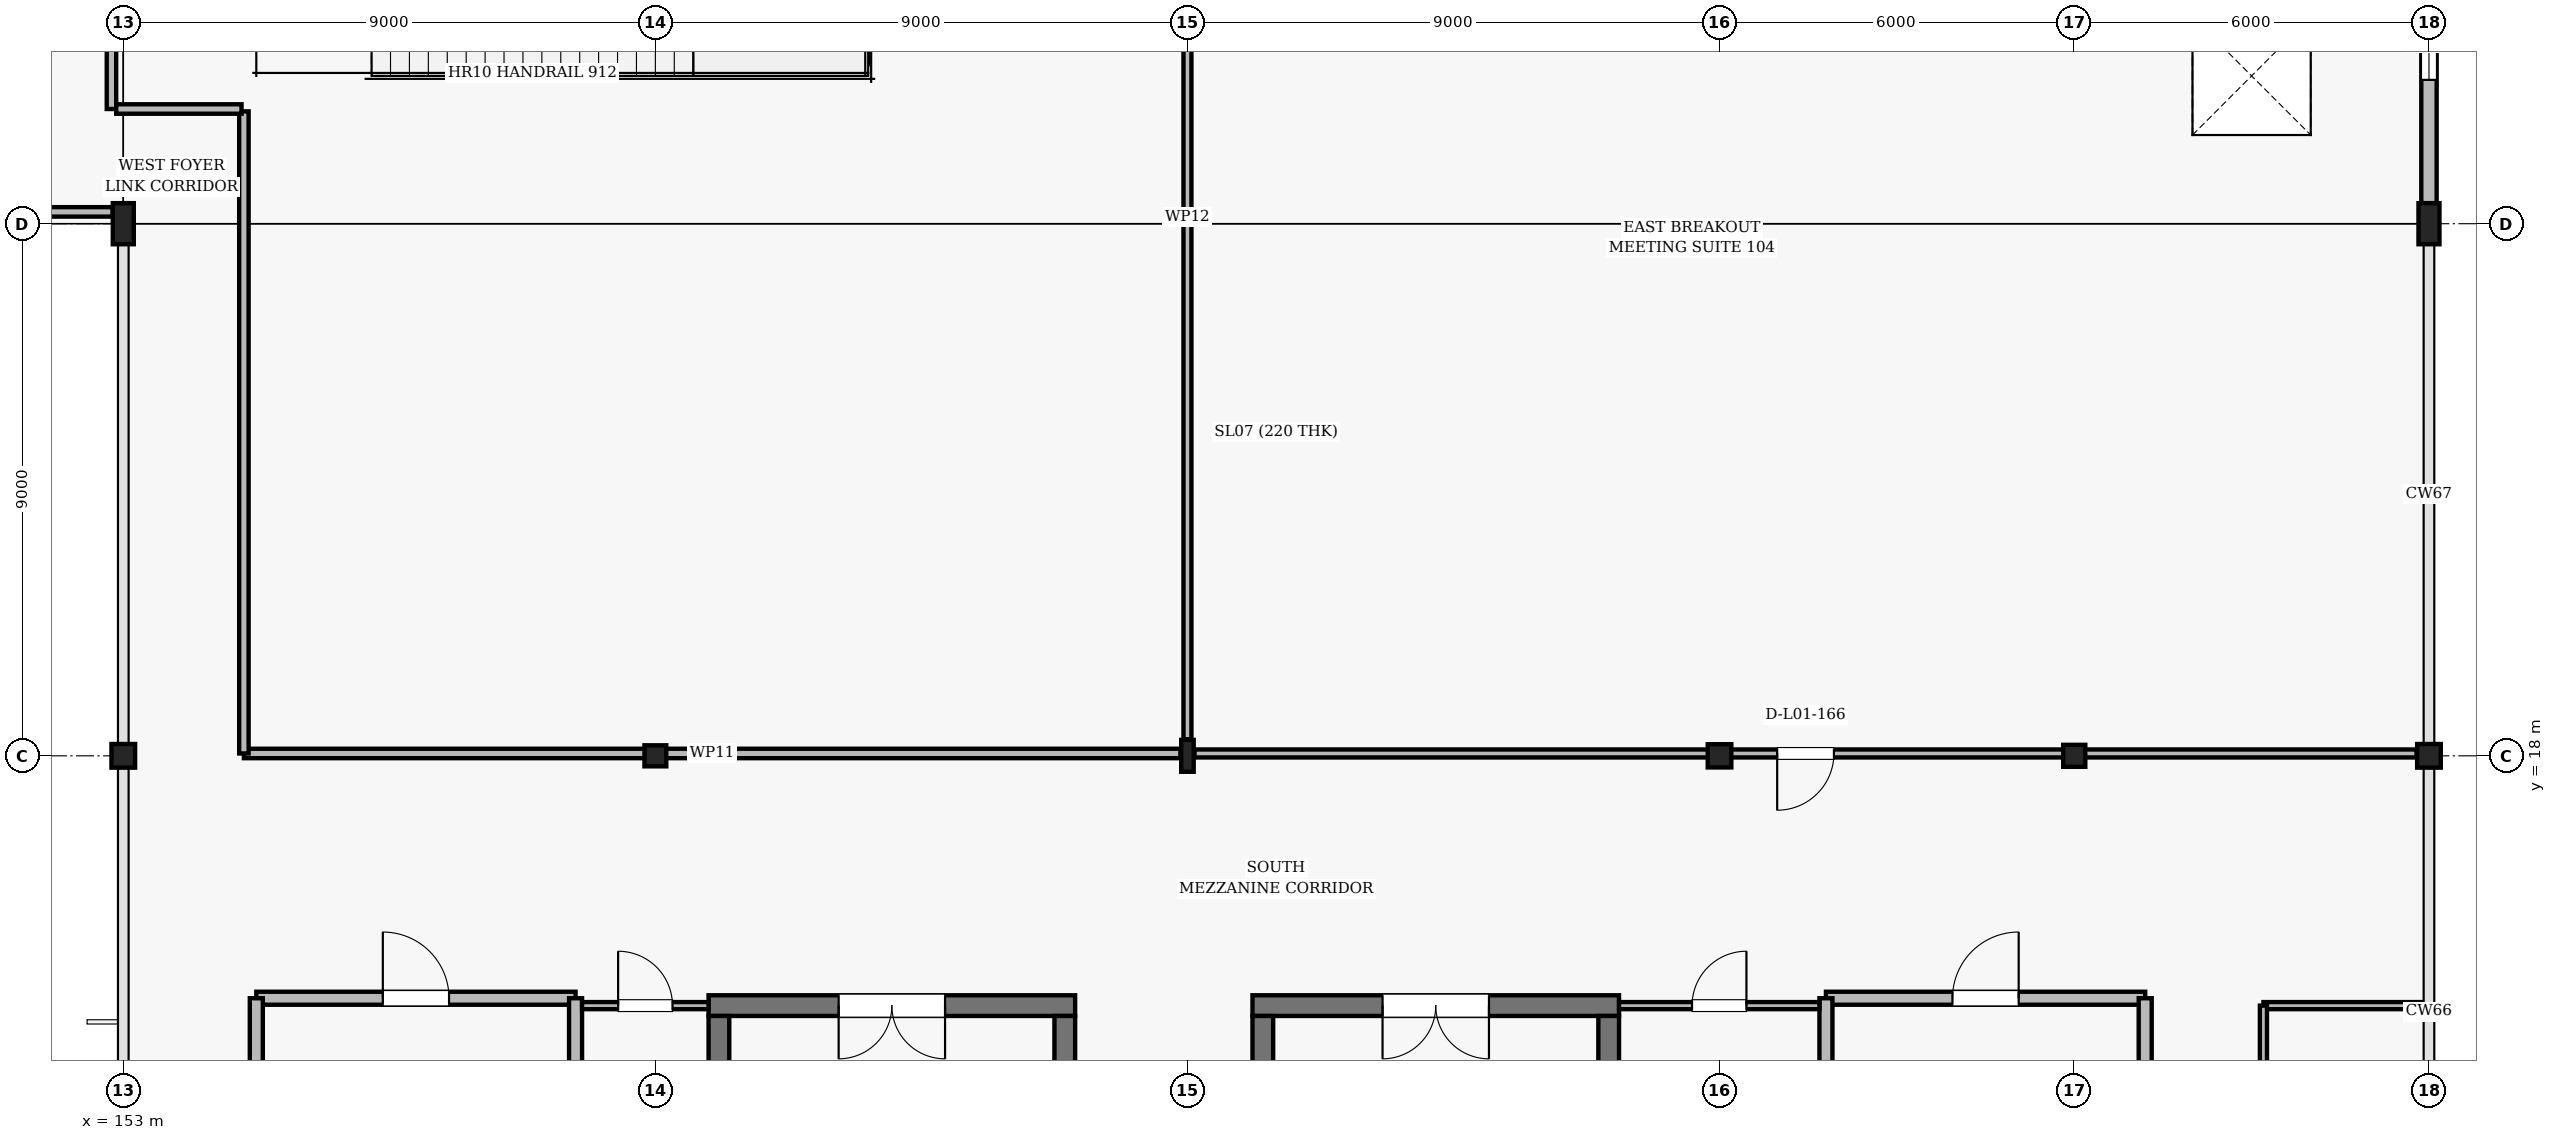
"""IFC4 building model, lengths in metres.
Left out: names, types, materials, properties, quantities, classifications, styles, units other than length and angle.
Written with IfcOpenShell. Run it as: python <this file> out.ifc"""

import sys

from ifc_helpers import new_model, si_unit, direction, frame, frame_2d, origin, origin_2d, place, context, subcontext, project, spatial, rectangle, hollow_rectangle, i_section, extrude, element, fill, save


model = new_model("IFC4")
c1 = context("Model", 3, precision=1e-05, world=origin(), true_north=direction((0.0, 1.0)))
c2 = subcontext(c1, "Body", "Model", "MODEL_VIEW")
j1 = project(units=[si_unit("LENGTHUNIT", "METRE"), si_unit("PLANEANGLEUNIT", "RADIAN")], contexts=[c1])
p1 = place(None, origin())
s1 = spatial("IfcSite", under=j1, at=p1, CompositionType="ELEMENT")
p2 = place(p1, origin())
s2 = spatial("IfcBuilding", under=s1, at=p2, CompositionType="ELEMENT")
p3 = place(p2, frame((0.0, 0.0, 5.4)))
s3 = spatial("IfcBuildingStorey", under=s2, at=p3, CompositionType="ELEMENT", Elevation=5.4)
p4 = place(p3, frame((153.0, 18.0, 0.0), z_axis=(0.0, 0.0, 1.0), x_axis=(1.0, 0.0, 0.0)))
e1 = element("IfcColumn", 1, at=p4, inside=s3, PredefinedType="COLUMN", context=c2, shape_type="SweptSolid", body=[
    extrude(hollow_rectangle(XDim=0.4, YDim=0.4, WallThickness=0.016, InnerFilletRadius=0.016, OuterFilletRadius=0.032, at=origin_2d()), origin(), (0.0, 0.0, 1.0), 5.4),
])
p5 = place(p3, frame((153.0, 27.0, 0.0), z_axis=(0.0, 0.0, 1.0), x_axis=(1.0, 0.0, 0.0)))
e2 = element("IfcColumn", 2, at=p5, inside=s3, PredefinedType="COLUMN", context=c2, shape_type="SweptSolid", body=[
    extrude(i_section(OverallWidth=0.355, OverallDepth=0.695, WebThickness=0.015, FlangeThickness=0.025, FilletRadius=0.018, at=origin_2d()), origin(), (0.0, 0.0, 1.0), 5.4),
])
p6 = place(p3, frame((162.0, 18.0, 0.0), z_axis=(0.0, 0.0, 1.0), x_axis=(1.0, 0.0, 0.0)))
e3 = element("IfcColumn", 3, at=p6, inside=s3, PredefinedType="COLUMN", context=c2, shape_type="SweptSolid", body=[
    extrude(i_section(OverallWidth=0.369, OverallDepth=0.356, WebThickness=0.011, FlangeThickness=0.018, FilletRadius=0.015, at=origin_2d()), origin(), (0.0, 0.0, 1.0), 5.4),
])
p7 = place(p3, frame((171.0, 18.0, 0.0), z_axis=(0.0, 0.0, 1.0), x_axis=(1.0, 0.0, 0.0)))
e4 = element("IfcColumn", 4, at=p7, inside=s3, PredefinedType="COLUMN", context=c2, shape_type="SweptSolid", body=[
    extrude(i_section(OverallWidth=0.211, OverallDepth=0.539, WebThickness=0.012, FlangeThickness=0.019, FilletRadius=0.014, at=origin_2d()), origin(), (0.0, 0.0, 1.0), 5.4),
])
p8 = place(p3, frame((180.0, 18.0, 0.0), z_axis=(0.0, 0.0, 1.0), x_axis=(1.0, 0.0, 0.0)))
e5 = element("IfcColumn", 5, at=p8, inside=s3, PredefinedType="COLUMN", context=c2, shape_type="SweptSolid", body=[
    extrude(i_section(OverallWidth=0.399, OverallDepth=0.393, WebThickness=0.023, FlangeThickness=0.037, FilletRadius=0.018, at=origin_2d()), origin(), (0.0, 0.0, 1.0), 5.4),
])
p9 = place(p3, frame((186.0, 18.0, 0.0), z_axis=(0.0, 0.0, 1.0), x_axis=(1.0, 0.0, 0.0)))
e6 = element("IfcColumn", 6, at=p9, inside=s3, PredefinedType="COLUMN", context=c2, shape_type="SweptSolid", body=[
    extrude(i_section(OverallWidth=0.374, OverallDepth=0.372, WebThickness=0.016, FlangeThickness=0.026, FilletRadius=0.016, at=origin_2d()), origin(), (0.0, 0.0, 1.0), 5.4),
])
p10 = place(p3, frame((192.0, 18.0, 0.0), z_axis=(0.0, 0.0, 1.0), x_axis=(1.0, 0.0, 0.0)))
e7 = element("IfcColumn", 7, at=p10, inside=s3, PredefinedType="COLUMN", context=c2, shape_type="SweptSolid", body=[
    extrude(hollow_rectangle(XDim=0.4, YDim=0.4, WallThickness=0.016, InnerFilletRadius=0.016, OuterFilletRadius=0.032, at=origin_2d()), origin(), (0.0, 0.0, 1.0), 5.4),
])
p11 = place(p3, frame((192.0, 27.0, 0.0), z_axis=(0.0, 0.0, 1.0), x_axis=(1.0, 0.0, 0.0)))
e8 = element("IfcColumn", 8, at=p11, inside=s3, PredefinedType="COLUMN", context=c2, shape_type="SweptSolid", body=[
    extrude(i_section(OverallWidth=0.355, OverallDepth=0.695, WebThickness=0.015, FlangeThickness=0.025, FilletRadius=0.018, at=origin_2d()), origin(), (0.0, 0.0, 1.0), 5.4),
])
p12 = place(p3, frame((192.0, 35.788, 0.0), z_axis=(0.0, 0.0, 1.0), x_axis=(0.0, -1.0, 0.0)))
e9 = element("IfcWall", 9, at=p12, inside=s3, PredefinedType="SOLIDWALL", context=c2, shape_type="SweptSolid", body=[
    extrude(rectangle(XDim=8.44, YDim=0.26, at=frame_2d((4.22, 0.0))), origin(), (0.0, 0.0, 1.0), 4.825),
])
p13 = place(p12, frame((5.105, 0.0, 0.95)))
e10 = element("IfcOpeningElement", 10, at=p13, cuts=e9, PredefinedType="OPENING", context=c2, shape_type="SweptSolid", body=[
    extrude(rectangle(XDim=1.25, YDim=1.55, at=frame_2d((0.625, 0.775))), frame((0.0, 0.14, 0.0), z_axis=(0.0, -1.0, 0.0), x_axis=(1.0, 0.0, 0.0)), (0.0, 0.0, 1.0), 0.28),
])
p14 = place(p3, frame((169.1, 13.775, 0.0), z_axis=(0.0, 0.0, 1.0), x_axis=(-1.0, 0.0, 0.0)))
e11 = element("IfcWall", 11, at=p14, inside=s3, PredefinedType="SHEAR", context=c2, shape_type="SweptSolid", body=[
    extrude(rectangle(XDim=6.2, YDim=0.35, at=frame_2d((3.1, 0.0))), origin(), (0.0, 0.0, 1.0), 5.18),
])
p15 = place(p14, frame((2.2, 0.0, 0.0)))
e12 = element("IfcOpeningElement", 12, at=p15, cuts=e11, PredefinedType="OPENING", context=c2, shape_type="SweptSolid", body=[
    extrude(rectangle(XDim=1.8, YDim=2.2, at=frame_2d((0.9, 1.1))), frame((0.0, 0.185, 0.0), z_axis=(0.0, -1.0, 0.0), x_axis=(1.0, 0.0, 0.0)), (0.0, 0.0, 1.0), 0.37),
])
for number, where, z_axis, x_axis in (
    (13, (163.075, 13.6, 0.0), (0.0, 0.0, 1.0), (0.0, -1.0, 0.0)),
    (14, (168.925, 2.2, 0.0), (0.0, 0.0, 1.0), (0.0, 1.0, 0.0)),
):
    element("IfcWall", number, at=place(p3, frame(where, z_axis=z_axis, x_axis=x_axis)), inside=s3, PredefinedType="SHEAR", context=c2, shape_type="SweptSolid", body=[
        extrude(rectangle(XDim=11.4, YDim=0.35, at=frame_2d((5.7, 0.0))), origin(), (0.0, 0.0, 1.0), 5.18),
    ])
p16 = place(p3, frame((178.3, 13.775, 0.0), z_axis=(0.0, 0.0, 1.0), x_axis=(-1.0, 0.0, 0.0)))
e15 = element("IfcWall", 15, at=p16, inside=s3, PredefinedType="SHEAR", context=c2, shape_type="SweptSolid", body=[
    extrude(rectangle(XDim=6.2, YDim=0.35, at=frame_2d((3.1, 0.0))), origin(), (0.0, 0.0, 1.0), 5.18),
])
p17 = place(p16, frame((2.2, 0.0, 0.0)))
e16 = element("IfcOpeningElement", 16, at=p17, cuts=e15, PredefinedType="OPENING", context=c2, shape_type="SweptSolid", body=[
    extrude(rectangle(XDim=1.8, YDim=2.2, at=frame_2d((0.9, 1.1))), frame((0.0, 0.185, 0.0), z_axis=(0.0, -1.0, 0.0), x_axis=(1.0, 0.0, 0.0)), (0.0, 0.0, 1.0), 0.37),
])
for number, where, z_axis, x_axis in (
    (17, (172.275, 13.6, 0.0), (0.0, 0.0, 1.0), (0.0, -1.0, 0.0)),
    (18, (178.125, 2.2, 0.0), (0.0, 0.0, 1.0), (0.0, 1.0, 0.0)),
):
    element("IfcWall", number, at=place(p3, frame(where, z_axis=z_axis, x_axis=x_axis)), inside=s3, PredefinedType="SHEAR", context=c2, shape_type="SweptSolid", body=[
        extrude(rectangle(XDim=11.4, YDim=0.35, at=frame_2d((5.7, 0.0))), origin(), (0.0, 0.0, 1.0), 5.18),
    ])
p18 = place(p3, frame((162.72, 29.7, 0.0), z_axis=(0.0, 0.0, 1.0), x_axis=(1.0, 0.0, 0.0)))
e19 = element("IfcWall", 19, at=p18, inside=s3, PredefinedType="SHEAR", context=c2, shape_type="SweptSolid", body=[
    extrude(rectangle(XDim=2.7, YDim=0.35, at=frame_2d((1.35, 0.0))), origin(), (0.0, 0.0, 1.0), 2.5),
])
p19 = place(p3, frame((165.42, 29.7, 0.0), z_axis=(0.0, 0.0, 1.0), x_axis=(0.0, 1.0, 0.0)))
e20 = element("IfcWall", 20, at=p19, inside=s3, PredefinedType="SHEAR", context=c2, shape_type="SweptSolid", body=[
    extrude(rectangle(XDim=3.78, YDim=0.35, at=frame_2d((1.89, 0.0))), origin(), (0.0, 0.0, 1.0), 2.5),
])
p20 = place(p3, frame((155.25, 13.9, 0.0), z_axis=(0.0, 0.0, 1.0), x_axis=(1.0, 0.0, 0.0)))
e21 = element("IfcWall", 21, at=p20, inside=s3, PredefinedType="SOLIDWALL", context=c2, shape_type="SweptSolid", body=[
    extrude(rectangle(XDim=5.4, YDim=0.22, at=frame_2d((2.7, 0.0))), origin(), (0.0, 0.0, 1.0), 5.16),
])
p21 = place(p20, frame((2.14, 0.0, 0.0)))
e22 = element("IfcOpeningElement", 22, at=p21, cuts=e21, PredefinedType="OPENING", context=c2, shape_type="SweptSolid", body=[
    extrude(rectangle(XDim=1.12, YDim=2.2, at=frame_2d((0.56, 1.1))), frame((0.0, 0.12, 0.0), z_axis=(0.0, -1.0, 0.0), x_axis=(1.0, 0.0, 0.0)), (0.0, 0.0, 1.0), 0.24),
])
for number, where, z_axis, x_axis in (
    (23, (155.25, 10.85, 0.0), (0.0, 0.0, 1.0), (0.0, 1.0, 0.0)),
    (24, (160.65, 10.85, 0.0), (0.0, 0.0, 1.0), (0.0, 1.0, 0.0)),
):
    element("IfcWall", number, at=place(p3, frame(where, z_axis=z_axis, x_axis=x_axis)), inside=s3, PredefinedType="SOLIDWALL", context=c2, shape_type="SweptSolid", body=[
        extrude(rectangle(XDim=3.05, YDim=0.22, at=frame_2d((1.525, 0.0))), origin(), (0.0, 0.0, 1.0), 5.16),
    ])
p22 = place(p3, frame((181.8, 13.9, 0.0), z_axis=(0.0, 0.0, 1.0), x_axis=(1.0, 0.0, 0.0)))
e25 = element("IfcWall", 25, at=p22, inside=s3, PredefinedType="SOLIDWALL", context=c2, shape_type="SweptSolid", body=[
    extrude(rectangle(XDim=5.4, YDim=0.22, at=frame_2d((2.7, 0.0))), origin(), (0.0, 0.0, 1.0), 5.16),
])
p23 = place(p22, frame((2.14, 0.0, 0.0)))
e26 = element("IfcOpeningElement", 26, at=p23, cuts=e25, PredefinedType="OPENING", context=c2, shape_type="SweptSolid", body=[
    extrude(rectangle(XDim=1.12, YDim=2.2, at=frame_2d((0.56, 1.1))), frame((0.0, 0.12, 0.0), z_axis=(0.0, -1.0, 0.0), x_axis=(1.0, 0.0, 0.0)), (0.0, 0.0, 1.0), 0.24),
])
for number, where, z_axis, x_axis in (
    (27, (181.8, 10.85, 0.0), (0.0, 0.0, 1.0), (0.0, 1.0, 0.0)),
    (28, (187.2, 10.85, 0.0), (0.0, 0.0, 1.0), (0.0, 1.0, 0.0)),
):
    element("IfcWall", number, at=place(p3, frame(where, z_axis=z_axis, x_axis=x_axis)), inside=s3, PredefinedType="SOLIDWALL", context=c2, shape_type="SweptSolid", body=[
        extrude(rectangle(XDim=3.05, YDim=0.22, at=frame_2d((1.525, 0.0))), origin(), (0.0, 0.0, 1.0), 5.16),
    ])
p24 = place(p3, frame((160.76, 13.775, 0.0), z_axis=(0.0, 0.0, 1.0), x_axis=(1.0, 0.0, 0.0)))
e29 = element("IfcWall", 29, at=p24, inside=s3, PredefinedType="PARTITIONING", context=c2, shape_type="SweptSolid", body=[
    extrude(rectangle(XDim=2.14, YDim=0.12, at=frame_2d((1.07, 0.0))), origin(), (0.0, 0.0, 1.0), 4.47),
])
p25 = place(p24, frame((0.61, 0.0, 0.0)))
e30 = element("IfcOpeningElement", 30, at=p25, cuts=e29, PredefinedType="OPENING", context=c2, shape_type="SweptSolid", body=[
    extrude(rectangle(XDim=0.92, YDim=2.12, at=frame_2d((0.46, 1.06))), frame((0.0, 0.07, 0.0), z_axis=(0.0, -1.0, 0.0), x_axis=(1.0, 0.0, 0.0)), (0.0, 0.0, 1.0), 0.14),
])
p26 = place(p3, frame((178.3, 13.775, 0.0), z_axis=(0.0, 0.0, 1.0), x_axis=(1.0, 0.0, 0.0)))
e31 = element("IfcWall", 31, at=p26, inside=s3, PredefinedType="PARTITIONING", context=c2, shape_type="SweptSolid", body=[
    extrude(rectangle(XDim=3.39, YDim=0.12, at=frame_2d((1.695, 0.0))), origin(), (0.0, 0.0, 1.0), 4.392),
])
p27 = place(p26, frame((1.235, 0.0, 0.0)))
e32 = element("IfcOpeningElement", 32, at=p27, cuts=e31, PredefinedType="OPENING", context=c2, shape_type="SweptSolid", body=[
    extrude(rectangle(XDim=0.92, YDim=2.12, at=frame_2d((0.46, 1.06))), frame((0.0, 0.07, 0.0), z_axis=(0.0, -1.0, 0.0), x_axis=(1.0, 0.0, 0.0)), (0.0, 0.0, 1.0), 0.14),
])
p28 = place(p3, frame((189.2, 13.775, 0.0), z_axis=(0.0, 0.0, 1.0), x_axis=(1.0, 0.0, 0.0)))
e33 = element("IfcWall", 33, at=p28, inside=s3, PredefinedType="PARTITIONING", context=c2, shape_type="SweptSolid", body=[
    extrude(rectangle(XDim=2.788, YDim=0.12, at=frame_2d((1.394, 0.0))), origin(), (0.0, 0.0, 1.0), 4.626),
])
p29 = place(p3, frame((189.2, 9.65, 0.0), z_axis=(0.0, 0.0, 1.0), x_axis=(0.0, 1.0, 0.0)))
e34 = element("IfcWall", 34, at=p29, inside=s3, PredefinedType="PARTITIONING", context=c2, shape_type="SweptSolid", body=[
    extrude(rectangle(XDim=4.125, YDim=0.12, at=frame_2d((2.062, 0.0))), origin(), (0.0, 0.0, 1.0), 5.16),
])
p30 = place(p29, frame((1.552, 0.0, 0.0)))
e35 = element("IfcOpeningElement", 35, at=p30, cuts=e34, PredefinedType="OPENING", context=c2, shape_type="SweptSolid", body=[
    extrude(rectangle(XDim=1.02, YDim=2.16, at=frame_2d((0.51, 1.08))), frame((0.0, 0.07, 0.0), z_axis=(0.0, -1.0, 0.0), x_axis=(1.0, 0.0, 0.0)), (0.0, 0.0, 1.0), 0.14),
])
p31 = place(p3, frame((191.79, 18.04, 0.0), z_axis=(0.0, 0.0, 1.0), x_axis=(-1.0, 0.0, 0.0)))
e36 = element("IfcWall", 36, at=p31, inside=s3, PredefinedType="PARTITIONING", context=c2, shape_type="SweptSolid", body=[
    extrude(rectangle(XDim=20.67, YDim=0.135, at=frame_2d((10.335, 0.0))), origin(), (0.0, 0.0, 1.0), 4.27),
])
p32 = place(p31, frame((9.855, 0.0, 0.0)))
e37 = element("IfcOpeningElement", 37, at=p32, cuts=e36, PredefinedType="OPENING", context=c2, shape_type="SweptSolid", body=[
    extrude(rectangle(XDim=0.96, YDim=2.15, at=frame_2d((0.48, 1.075))), frame((0.0, 0.078, 0.0), z_axis=(0.0, -1.0, 0.0), x_axis=(1.0, 0.0, 0.0)), (0.0, 0.0, 1.0), 0.155),
])
p33 = place(p3, frame((171.0, 18.28, 0.0), z_axis=(0.0, 0.0, 1.0), x_axis=(0.0, 1.0, 0.0)))
e38 = element("IfcWall", 38, at=p33, inside=s3, PredefinedType="PARTITIONING", context=c2, shape_type="SweptSolid", body=[
    extrude(rectangle(XDim=17.68, YDim=0.135, at=frame_2d((8.84, 0.0))), origin(), (0.0, 0.0, 1.0), 3.125),
])
p34 = place(p3, frame((152.8, 44.44, 0.0), z_axis=(0.0, 0.0, 1.0), x_axis=(0.0, -1.0, 0.0)))
e39 = element("IfcWall", 39, at=p34, inside=s3, PredefinedType="PARTITIONING", context=c2, shape_type="SweptSolid", body=[
    extrude(rectangle(XDim=15.5, YDim=0.16, at=frame_2d((7.75, 0.0))), origin(), (0.0, 0.0, 1.0), 3.125),
])
p35 = place(p34, frame((4.3, 0.0, 0.0)))
e40 = element("IfcOpeningElement", 40, at=p35, cuts=e39, PredefinedType="OPENING", context=c2, shape_type="SweptSolid", body=[
    extrude(rectangle(XDim=2.25, YDim=2.4, at=frame_2d((1.125, 1.2))), frame((0.0, 0.09, 0.0), z_axis=(0.0, -1.0, 0.0), x_axis=(1.0, 0.0, 0.0)), (0.0, 0.0, 1.0), 0.18),
])
p36 = place(p3, frame((152.821, 27.2, 0.0), z_axis=(0.0, 0.0, 1.0), x_axis=(-1.0, 0.0, 0.0)))
e41 = element("IfcWall", 41, at=p36, inside=s3, PredefinedType="PARTITIONING", context=c2, shape_type="SweptSolid", body=[
    extrude(rectangle(XDim=17.996, YDim=0.16, at=frame_2d((8.998, 0.0))), origin(), (0.0, 0.0, 1.0), 4.213),
])
p37 = place(p3, frame((170.88, 18.04, 0.0), z_axis=(0.0, 0.0, 1.0), x_axis=(-1.0, 0.0, 0.0)))
e42 = element("IfcWall", 42, at=p37, inside=s3, PredefinedType="PARTITIONING", context=c2, shape_type="SweptSolid", body=[
    extrude(rectangle(XDim=15.84, YDim=0.16, at=frame_2d((7.92, 0.0))), origin(), (0.0, 0.0, 1.0), 4.27),
])
p38 = place(p3, frame((155.04, 18.04, 0.0), z_axis=(0.0, 0.0, 1.0), x_axis=(0.0, 1.0, 0.0)))
e43 = element("IfcWall", 43, at=p38, inside=s3, PredefinedType="PARTITIONING", context=c2, shape_type="SweptSolid", body=[
    extrude(rectangle(XDim=10.86, YDim=0.16, at=frame_2d((5.43, 0.0))), origin(), (0.0, 0.0, 1.0), 4.213),
])
p39 = place(p3, frame((155.0, 28.94, 0.0), z_axis=(0.0, 0.0, 1.0), x_axis=(-1.0, 0.0, 0.0)))
e44 = element("IfcWall", 44, at=p39, inside=s3, PredefinedType="PARTITIONING", context=c2, shape_type="SweptSolid", body=[
    extrude(rectangle(XDim=2.12, YDim=0.16, at=frame_2d((1.06, 0.0))), origin(), (0.0, 0.0, 1.0), 4.43),
])
p40 = place(p13, origin())
e45 = element("IfcWindow", 45, at=p40, inside=s3, PartitioningType="SINGLE_PANEL", PredefinedType="WINDOW", context=c2, shape_type="SweptSolid", body=[
    extrude(rectangle(XDim=1.25, YDim=1.55, at=frame_2d((0.625, 0.775))), frame((0.0, 0.03, 0.0), z_axis=(0.0, -1.0, 0.0), x_axis=(1.0, 0.0, 0.0)), (0.0, 0.0, 1.0), 0.06),
])
fill(e10, e45)
p41 = place(p15, origin())
e46 = element("IfcDoor", 46, at=p41, inside=s3, OperationType="DOUBLE_DOOR_SINGLE_SWING", PredefinedType="DOOR", context=c2, shape_type="SweptSolid", body=[
    extrude(rectangle(XDim=1.8, YDim=2.2, at=frame_2d((0.9, 1.1))), frame((0.0, 0.025, 0.0), z_axis=(0.0, -1.0, 0.0), x_axis=(1.0, 0.0, 0.0)), (0.0, 0.0, 1.0), 0.05),
])
fill(e12, e46)
p42 = place(p17, origin())
e47 = element("IfcDoor", 47, at=p42, inside=s3, OperationType="DOUBLE_DOOR_SINGLE_SWING", PredefinedType="DOOR", context=c2, shape_type="SweptSolid", body=[
    extrude(rectangle(XDim=1.8, YDim=2.2, at=frame_2d((0.9, 1.1))), frame((0.0, 0.025, 0.0), z_axis=(0.0, -1.0, 0.0), x_axis=(1.0, 0.0, 0.0)), (0.0, 0.0, 1.0), 0.05),
])
fill(e16, e47)
p43 = place(p21, origin())
e48 = element("IfcDoor", 48, at=p43, inside=s3, OperationType="SINGLE_SWING_LEFT", PredefinedType="DOOR", context=c2, shape_type="SweptSolid", body=[
    extrude(rectangle(XDim=1.12, YDim=2.2, at=frame_2d((0.56, 1.1))), frame((0.0, 0.025, 0.0), z_axis=(0.0, -1.0, 0.0), x_axis=(1.0, 0.0, 0.0)), (0.0, 0.0, 1.0), 0.05),
])
fill(e22, e48)
p44 = place(p23, origin())
e49 = element("IfcDoor", 49, at=p44, inside=s3, OperationType="SINGLE_SWING_RIGHT", PredefinedType="DOOR", context=c2, shape_type="SweptSolid", body=[
    extrude(rectangle(XDim=1.12, YDim=2.2, at=frame_2d((0.56, 1.1))), frame((0.0, 0.025, 0.0), z_axis=(0.0, -1.0, 0.0), x_axis=(1.0, 0.0, 0.0)), (0.0, 0.0, 1.0), 0.05),
])
fill(e26, e49)
p45 = place(p25, origin())
e50 = element("IfcDoor", 50, at=p45, inside=s3, OperationType="SINGLE_SWING_LEFT", PredefinedType="DOOR", context=c2, shape_type="SweptSolid", body=[
    extrude(rectangle(XDim=0.92, YDim=2.12, at=frame_2d((0.46, 1.06))), frame((0.0, 0.025, 0.0), z_axis=(0.0, -1.0, 0.0), x_axis=(1.0, 0.0, 0.0)), (0.0, 0.0, 1.0), 0.05),
])
fill(e30, e50)
p46 = place(p27, origin())
e51 = element("IfcDoor", 51, at=p46, inside=s3, OperationType="SINGLE_SWING_RIGHT", PredefinedType="DOOR", context=c2, shape_type="SweptSolid", body=[
    extrude(rectangle(XDim=0.92, YDim=2.12, at=frame_2d((0.46, 1.06))), frame((0.0, 0.025, 0.0), z_axis=(0.0, -1.0, 0.0), x_axis=(1.0, 0.0, 0.0)), (0.0, 0.0, 1.0), 0.05),
])
fill(e32, e51)
p47 = place(p32, origin())
e52 = element("IfcDoor", 52, at=p47, inside=s3, OperationType="SINGLE_SWING_RIGHT", PredefinedType="DOOR", context=c2, shape_type="SweptSolid", body=[
    extrude(rectangle(XDim=0.96, YDim=2.15, at=frame_2d((0.48, 1.075))), frame((0.0, 0.025, 0.0), z_axis=(0.0, -1.0, 0.0), x_axis=(1.0, 0.0, 0.0)), (0.0, 0.0, 1.0), 0.05),
])
fill(e37, e52)
save(model, sys.argv[1])
